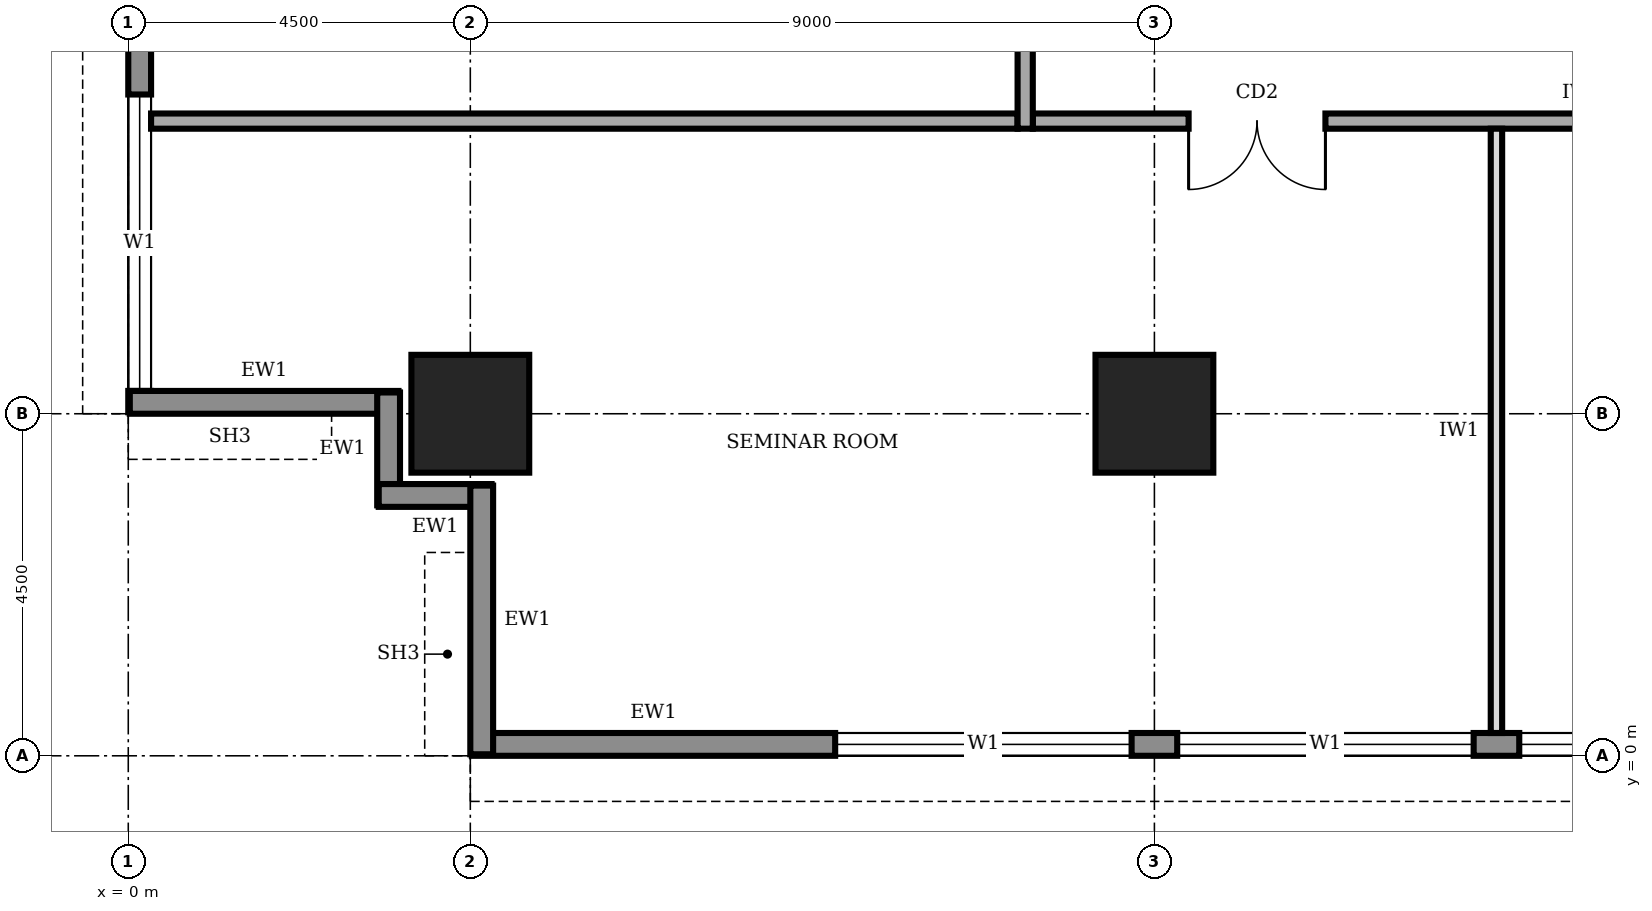
"""IFC4 building model, lengths in metres.
Left out: names, types, materials, properties, quantities, classifications, styles, units other than length and angle.
Written with IfcOpenShell. Run it as: python <this file> out.ifc"""

import sys

from ifc_helpers import new_model, si_unit, direction, frame, frame_2d, origin, origin_2d, place, context, subcontext, project, spatial, rectangle, extrude, element, fill, save


model = new_model("IFC4")
c1 = context("Model", 3, precision=1e-05, world=origin(), true_north=direction((0.0, 1.0)))
c2 = subcontext(c1, "Body", "Model", "MODEL_VIEW")
j1 = project(units=[si_unit("LENGTHUNIT", "METRE"), si_unit("PLANEANGLEUNIT", "RADIAN")], contexts=[c1])
p1 = place(None, origin())
s1 = spatial("IfcSite", under=j1, at=p1, CompositionType="ELEMENT")
p2 = place(p1, origin())
s2 = spatial("IfcBuilding", under=s1, at=p2, CompositionType="ELEMENT")
p3 = place(p2, frame((0.0, 0.0, 225.0)))
s3 = spatial("IfcBuildingStorey", under=s2, at=p3, CompositionType="ELEMENT", Elevation=225.0)
for number, where, z_axis, x_axis in (
    (1, (4.5, 4.5, 0.0), (0.0, 0.0, 1.0), (1.0, 0.0, 0.0)),
    (2, (13.5, 4.5, 0.0), (0.0, 0.0, 1.0), (1.0, 0.0, 0.0)),
):
    element("IfcColumn", number, at=place(p3, frame(where, z_axis=z_axis, x_axis=x_axis)), inside=s3, PredefinedType="COLUMN", context=c2, shape_type="SweptSolid", body=[
        extrude(rectangle(XDim=1.55, YDim=1.55, at=origin_2d()), origin(), (0.0, 0.0, 1.0), 4.0),
    ])
p4 = place(p3, frame((4.52, 0.15, 0.0), z_axis=(0.0, 0.0, 1.0), x_axis=(1.0, 0.0, 0.0)))
e3 = element("IfcWall", 3, at=p4, inside=s3, PredefinedType="STANDARD", context=c2, shape_type="SweptSolid", body=[
    extrude(rectangle(XDim=31.46, YDim=0.3, at=frame_2d((15.73, 0.0))), origin(), (0.0, 0.0, 1.0), 3.75),
])
p5 = place(p4, frame((4.78, 0.0, 0.9)))
e4 = element("IfcOpeningElement", 4, at=p5, cuts=e3, PredefinedType="OPENING", context=c2, shape_type="SweptSolid", body=[
    extrude(rectangle(XDim=3.9, YDim=2.2, at=frame_2d((1.95, 1.1))), frame((0.0, 0.16, 0.0), z_axis=(0.0, -1.0, 0.0), x_axis=(1.0, 0.0, 0.0)), (0.0, 0.0, 1.0), 0.32),
])
p6 = place(p4, frame((9.28, 0.0, 0.9)))
e5 = element("IfcOpeningElement", 5, at=p6, cuts=e3, PredefinedType="OPENING", context=c2, shape_type="SweptSolid", body=[
    extrude(rectangle(XDim=3.9, YDim=2.2, at=frame_2d((1.95, 1.1))), frame((0.0, 0.16, 0.0), z_axis=(0.0, -1.0, 0.0), x_axis=(1.0, 0.0, 0.0)), (0.0, 0.0, 1.0), 0.32),
])
p7 = place(p4, frame((13.78, 0.0, 0.9)))
e6 = element("IfcOpeningElement", 6, at=p7, cuts=e3, PredefinedType="OPENING", context=c2, shape_type="SweptSolid", body=[
    extrude(rectangle(XDim=3.9, YDim=2.2, at=frame_2d((1.95, 1.1))), frame((0.0, 0.16, 0.0), z_axis=(0.0, -1.0, 0.0), x_axis=(1.0, 0.0, 0.0)), (0.0, 0.0, 1.0), 0.32),
])
p8 = place(p4, frame((18.28, 0.0, 0.9)))
e7 = element("IfcOpeningElement", 7, at=p8, cuts=e3, PredefinedType="OPENING", context=c2, shape_type="SweptSolid", body=[
    extrude(rectangle(XDim=3.9, YDim=2.2, at=frame_2d((1.95, 1.1))), frame((0.0, 0.16, 0.0), z_axis=(0.0, -1.0, 0.0), x_axis=(1.0, 0.0, 0.0)), (0.0, 0.0, 1.0), 0.32),
])
p9 = place(p4, frame((22.78, 0.0, 0.9)))
e8 = element("IfcOpeningElement", 8, at=p9, cuts=e3, PredefinedType="OPENING", context=c2, shape_type="SweptSolid", body=[
    extrude(rectangle(XDim=3.9, YDim=2.2, at=frame_2d((1.95, 1.1))), frame((0.0, 0.16, 0.0), z_axis=(0.0, -1.0, 0.0), x_axis=(1.0, 0.0, 0.0)), (0.0, 0.0, 1.0), 0.32),
])
p10 = place(p4, frame((27.28, 0.0, 0.9)))
e9 = element("IfcOpeningElement", 9, at=p10, cuts=e3, PredefinedType="OPENING", context=c2, shape_type="SweptSolid", body=[
    extrude(rectangle(XDim=3.9, YDim=2.2, at=frame_2d((1.95, 1.1))), frame((0.0, 0.16, 0.0), z_axis=(0.0, -1.0, 0.0), x_axis=(1.0, 0.0, 0.0)), (0.0, 0.0, 1.0), 0.32),
])
p11 = place(p3, frame((0.15, 35.98, 0.0), z_axis=(0.0, 0.0, 1.0), x_axis=(0.0, -1.0, 0.0)))
e10 = element("IfcWall", 10, at=p11, inside=s3, PredefinedType="STANDARD", context=c2, shape_type="SweptSolid", body=[
    extrude(rectangle(XDim=31.46, YDim=0.3, at=frame_2d((15.73, 0.0))), origin(), (0.0, 0.0, 1.0), 3.75),
])
p12 = place(p11, frame((27.28, 0.0, 0.9)))
e11 = element("IfcOpeningElement", 11, at=p12, cuts=e10, PredefinedType="OPENING", context=c2, shape_type="SweptSolid", body=[
    extrude(rectangle(XDim=3.9, YDim=2.2, at=frame_2d((1.95, 1.1))), frame((0.0, 0.16, 0.0), z_axis=(0.0, -1.0, 0.0), x_axis=(1.0, 0.0, 0.0)), (0.0, 0.0, 1.0), 0.32),
])
p13 = place(p11, frame((22.78, 0.0, 0.9)))
e12 = element("IfcOpeningElement", 12, at=p13, cuts=e10, PredefinedType="OPENING", context=c2, shape_type="SweptSolid", body=[
    extrude(rectangle(XDim=3.9, YDim=2.2, at=frame_2d((1.95, 1.1))), frame((0.0, 0.16, 0.0), z_axis=(0.0, -1.0, 0.0), x_axis=(1.0, 0.0, 0.0)), (0.0, 0.0, 1.0), 0.32),
])
p14 = place(p11, frame((18.28, 0.0, 0.9)))
e13 = element("IfcOpeningElement", 13, at=p14, cuts=e10, PredefinedType="OPENING", context=c2, shape_type="SweptSolid", body=[
    extrude(rectangle(XDim=3.9, YDim=2.2, at=frame_2d((1.95, 1.1))), frame((0.0, 0.16, 0.0), z_axis=(0.0, -1.0, 0.0), x_axis=(1.0, 0.0, 0.0)), (0.0, 0.0, 1.0), 0.32),
])
p15 = place(p11, frame((13.78, 0.0, 0.9)))
e14 = element("IfcOpeningElement", 14, at=p15, cuts=e10, PredefinedType="OPENING", context=c2, shape_type="SweptSolid", body=[
    extrude(rectangle(XDim=3.9, YDim=2.2, at=frame_2d((1.95, 1.1))), frame((0.0, 0.16, 0.0), z_axis=(0.0, -1.0, 0.0), x_axis=(1.0, 0.0, 0.0)), (0.0, 0.0, 1.0), 0.32),
])
p16 = place(p11, frame((9.28, 0.0, 0.9)))
e15 = element("IfcOpeningElement", 15, at=p16, cuts=e10, PredefinedType="OPENING", context=c2, shape_type="SweptSolid", body=[
    extrude(rectangle(XDim=3.9, YDim=2.2, at=frame_2d((1.95, 1.1))), frame((0.0, 0.16, 0.0), z_axis=(0.0, -1.0, 0.0), x_axis=(1.0, 0.0, 0.0)), (0.0, 0.0, 1.0), 0.32),
])
p17 = place(p11, frame((4.78, 0.0, 0.9)))
e16 = element("IfcOpeningElement", 16, at=p17, cuts=e10, PredefinedType="OPENING", context=c2, shape_type="SweptSolid", body=[
    extrude(rectangle(XDim=3.9, YDim=2.2, at=frame_2d((1.95, 1.1))), frame((0.0, 0.16, 0.0), z_axis=(0.0, -1.0, 0.0), x_axis=(1.0, 0.0, 0.0)), (0.0, 0.0, 1.0), 0.32),
])
p18 = place(p3, frame((0.02, 4.65, 0.0), z_axis=(0.0, 0.0, 1.0), x_axis=(1.0, 0.0, 0.0)))
e17 = element("IfcWall", 17, at=p18, inside=s3, PredefinedType="STANDARD", context=c2, shape_type="SweptSolid", body=[
    extrude(rectangle(XDim=3.535, YDim=0.3, at=frame_2d((1.768, 0.0))), origin(), (0.0, 0.0, 1.0), 2.65),
])
for number, where, z_axis, x_axis in (
    (18, (3.425, 4.78, 0.0), (0.0, 0.0, 1.0), (0.0, -1.0, 0.0)),
    (19, (3.295, 3.425, 0.0), (0.0, 0.0, 1.0), (1.0, 0.0, 0.0)),
):
    element("IfcWall", number, at=place(p3, frame(where, z_axis=z_axis, x_axis=x_axis)), inside=s3, PredefinedType="STANDARD", context=c2, shape_type="SweptSolid", body=[
        extrude(rectangle(XDim=1.485, YDim=0.3, at=frame_2d((0.743, 0.0))), origin(), (0.0, 0.0, 1.0), 3.75),
    ])
p19 = place(p3, frame((4.65, 3.555, 0.0), z_axis=(0.0, 0.0, 1.0), x_axis=(0.0, -1.0, 0.0)))
e20 = element("IfcWall", 20, at=p19, inside=s3, PredefinedType="STANDARD", context=c2, shape_type="SweptSolid", body=[
    extrude(rectangle(XDim=3.535, YDim=0.3, at=frame_2d((1.768, 0.0))), origin(), (0.0, 0.0, 1.0), 2.65),
])
p20 = place(p3, frame((11.9, 8.35, 0.0), z_axis=(0.0, 0.0, 1.0), x_axis=(1.0, 0.0, 0.0)))
e21 = element("IfcWall", 21, at=p20, inside=s3, PredefinedType="SOLIDWALL", context=c2, shape_type="SweptSolid", body=[
    extrude(rectangle(XDim=16.9, YDim=0.2, at=frame_2d((8.45, 0.0))), origin(), (0.0, 0.0, 1.0), 3.75),
])
p21 = place(p20, frame((2.05, 0.0, 0.0)))
e22 = element("IfcOpeningElement", 22, at=p21, cuts=e21, PredefinedType="OPENING", context=c2, shape_type="SweptSolid", body=[
    extrude(rectangle(XDim=1.8, YDim=2.1, at=frame_2d((0.9, 1.05))), frame((0.0, 0.11, 0.0), z_axis=(0.0, -1.0, 0.0), x_axis=(1.0, 0.0, 0.0)), (0.0, 0.0, 1.0), 0.22),
])
p22 = place(p20, frame((10.6, 0.0, 0.0)))
e23 = element("IfcOpeningElement", 23, at=p22, cuts=e21, PredefinedType="OPENING", context=c2, shape_type="SweptSolid", body=[
    extrude(rectangle(XDim=1.8, YDim=2.1, at=frame_2d((0.9, 1.05))), frame((0.0, 0.11, 0.0), z_axis=(0.0, -1.0, 0.0), x_axis=(1.0, 0.0, 0.0)), (0.0, 0.0, 1.0), 0.22),
])
p23 = place(p3, frame((11.8, 32.05, 0.0), z_axis=(0.0, 0.0, 1.0), x_axis=(0.0, -1.0, 0.0)))
e24 = element("IfcWall", 24, at=p23, inside=s3, PredefinedType="SOLIDWALL", context=c2, shape_type="SweptSolid", body=[
    extrude(rectangle(XDim=23.8, YDim=0.2, at=frame_2d((11.9, 0.0))), origin(), (0.0, 0.0, 1.0), 3.75),
])
p24 = place(p23, frame((20.675, 0.0, 0.0)))
e25 = element("IfcOpeningElement", 25, at=p24, cuts=e24, PredefinedType="OPENING", context=c2, shape_type="SweptSolid", body=[
    extrude(rectangle(XDim=1.0, YDim=2.1, at=frame_2d((0.5, 1.05))), frame((0.0, 0.11, 0.0), z_axis=(0.0, -1.0, 0.0), x_axis=(1.0, 0.0, 0.0)), (0.0, 0.0, 1.0), 0.22),
])
p25 = place(p23, frame((16.95, 0.0, 0.0)))
e26 = element("IfcOpeningElement", 26, at=p25, cuts=e24, PredefinedType="OPENING", context=c2, shape_type="SweptSolid", body=[
    extrude(rectangle(XDim=1.0, YDim=2.1, at=frame_2d((0.5, 1.05))), frame((0.0, 0.11, 0.0), z_axis=(0.0, -1.0, 0.0), x_axis=(1.0, 0.0, 0.0)), (0.0, 0.0, 1.0), 0.22),
])
p26 = place(p23, frame((13.95, 0.0, 0.0)))
e27 = element("IfcOpeningElement", 27, at=p26, cuts=e24, PredefinedType="OPENING", context=c2, shape_type="SweptSolid", body=[
    extrude(rectangle(XDim=0.9, YDim=2.1, at=frame_2d((0.45, 1.05))), frame((0.0, 0.11, 0.0), z_axis=(0.0, -1.0, 0.0), x_axis=(1.0, 0.0, 0.0)), (0.0, 0.0, 1.0), 0.22),
])
p27 = place(p23, frame((10.9, 0.0, 0.0)))
e28 = element("IfcOpeningElement", 28, at=p27, cuts=e24, PredefinedType="OPENING", context=c2, shape_type="SweptSolid", body=[
    extrude(rectangle(XDim=0.9, YDim=2.1, at=frame_2d((0.45, 1.05))), frame((0.0, 0.11, 0.0), z_axis=(0.0, -1.0, 0.0), x_axis=(1.0, 0.0, 0.0)), (0.0, 0.0, 1.0), 0.22),
])
p28 = place(p23, frame((6.2, 0.0, 0.0)))
e29 = element("IfcOpeningElement", 29, at=p28, cuts=e24, PredefinedType="OPENING", context=c2, shape_type="SweptSolid", body=[
    extrude(rectangle(XDim=0.9, YDim=2.1, at=frame_2d((0.45, 1.05))), frame((0.0, 0.11, 0.0), z_axis=(0.0, -1.0, 0.0), x_axis=(1.0, 0.0, 0.0)), (0.0, 0.0, 1.0), 0.22),
])
p29 = place(p23, frame((8.75, 0.0, 0.0)))
e30 = element("IfcOpeningElement", 30, at=p29, cuts=e24, PredefinedType="OPENING", context=c2, shape_type="SweptSolid", body=[
    extrude(rectangle(XDim=1.0, YDim=2.1, at=frame_2d((0.5, 1.05))), frame((0.0, 0.11, 0.0), z_axis=(0.0, -1.0, 0.0), x_axis=(1.0, 0.0, 0.0)), (0.0, 0.0, 1.0), 0.22),
])
p30 = place(p23, frame((1.925, 0.0, 0.0)))
e31 = element("IfcOpeningElement", 31, at=p30, cuts=e24, PredefinedType="OPENING", context=c2, shape_type="SweptSolid", body=[
    extrude(rectangle(XDim=1.0, YDim=2.1, at=frame_2d((0.5, 1.05))), frame((0.0, 0.11, 0.0), z_axis=(0.0, -1.0, 0.0), x_axis=(1.0, 0.0, 0.0)), (0.0, 0.0, 1.0), 0.22),
])
p31 = place(p3, frame((0.3, 8.35, 0.0), z_axis=(0.0, 0.0, 1.0), x_axis=(1.0, 0.0, 0.0)))
e32 = element("IfcWall", 32, at=p31, inside=s3, PredefinedType="SOLIDWALL", context=c2, shape_type="SweptSolid", body=[
    extrude(rectangle(XDim=11.4, YDim=0.2, at=frame_2d((5.7, 0.0))), origin(), (0.0, 0.0, 1.0), 3.75),
])
p32 = place(p3, frame((18.0, 0.3, 0.0), z_axis=(0.0, 0.0, 1.0), x_axis=(0.0, 1.0, 0.0)))
e33 = element("IfcWall", 33, at=p32, inside=s3, PredefinedType="PARTITIONING", context=c2, shape_type="SweptSolid", body=[
    extrude(rectangle(XDim=7.95, YDim=0.15, at=frame_2d((3.975, 0.0))), origin(), (0.0, 0.0, 1.0), 3.75),
])
p33 = place(p5, origin())
e34 = element("IfcWindow", 34, at=p33, inside=s3, PartitioningType="SINGLE_PANEL", PredefinedType="WINDOW", context=c2, shape_type="SweptSolid", body=[
    extrude(rectangle(XDim=3.9, YDim=2.2, at=frame_2d((1.95, 1.1))), frame((0.0, 0.03, 0.0), z_axis=(0.0, -1.0, 0.0), x_axis=(1.0, 0.0, 0.0)), (0.0, 0.0, 1.0), 0.06),
])
fill(e4, e34)
p34 = place(p6, origin())
e35 = element("IfcWindow", 35, at=p34, inside=s3, PartitioningType="SINGLE_PANEL", PredefinedType="WINDOW", context=c2, shape_type="SweptSolid", body=[
    extrude(rectangle(XDim=3.9, YDim=2.2, at=frame_2d((1.95, 1.1))), frame((0.0, 0.03, 0.0), z_axis=(0.0, -1.0, 0.0), x_axis=(1.0, 0.0, 0.0)), (0.0, 0.0, 1.0), 0.06),
])
fill(e5, e35)
p35 = place(p7, origin())
e36 = element("IfcWindow", 36, at=p35, inside=s3, PartitioningType="SINGLE_PANEL", PredefinedType="WINDOW", context=c2, shape_type="SweptSolid", body=[
    extrude(rectangle(XDim=3.9, YDim=2.2, at=frame_2d((1.95, 1.1))), frame((0.0, 0.03, 0.0), z_axis=(0.0, -1.0, 0.0), x_axis=(1.0, 0.0, 0.0)), (0.0, 0.0, 1.0), 0.06),
])
fill(e6, e36)
p36 = place(p12, origin())
e37 = element("IfcWindow", 37, at=p36, inside=s3, PartitioningType="SINGLE_PANEL", PredefinedType="WINDOW", context=c2, shape_type="SweptSolid", body=[
    extrude(rectangle(XDim=3.9, YDim=2.2, at=frame_2d((1.95, 1.1))), frame((0.0, 0.03, 0.0), z_axis=(0.0, -1.0, 0.0), x_axis=(1.0, 0.0, 0.0)), (0.0, 0.0, 1.0), 0.06),
])
fill(e11, e37)
p37 = place(p21, frame((1.8, 0.0, 0.0), z_axis=(0.0, 0.0, 1.0), x_axis=(-1.0, 0.0, 0.0)))
e38 = element("IfcDoor", 38, at=p37, inside=s3, OperationType="DOUBLE_DOOR_SINGLE_SWING", PredefinedType="DOOR", context=c2, shape_type="SweptSolid", body=[
    extrude(rectangle(XDim=1.8, YDim=2.1, at=frame_2d((0.9, 1.05))), frame((0.0, 0.025, 0.0), z_axis=(0.0, -1.0, 0.0), x_axis=(1.0, 0.0, 0.0)), (0.0, 0.0, 1.0), 0.05),
])
fill(e22, e38)
save(model, sys.argv[1])
